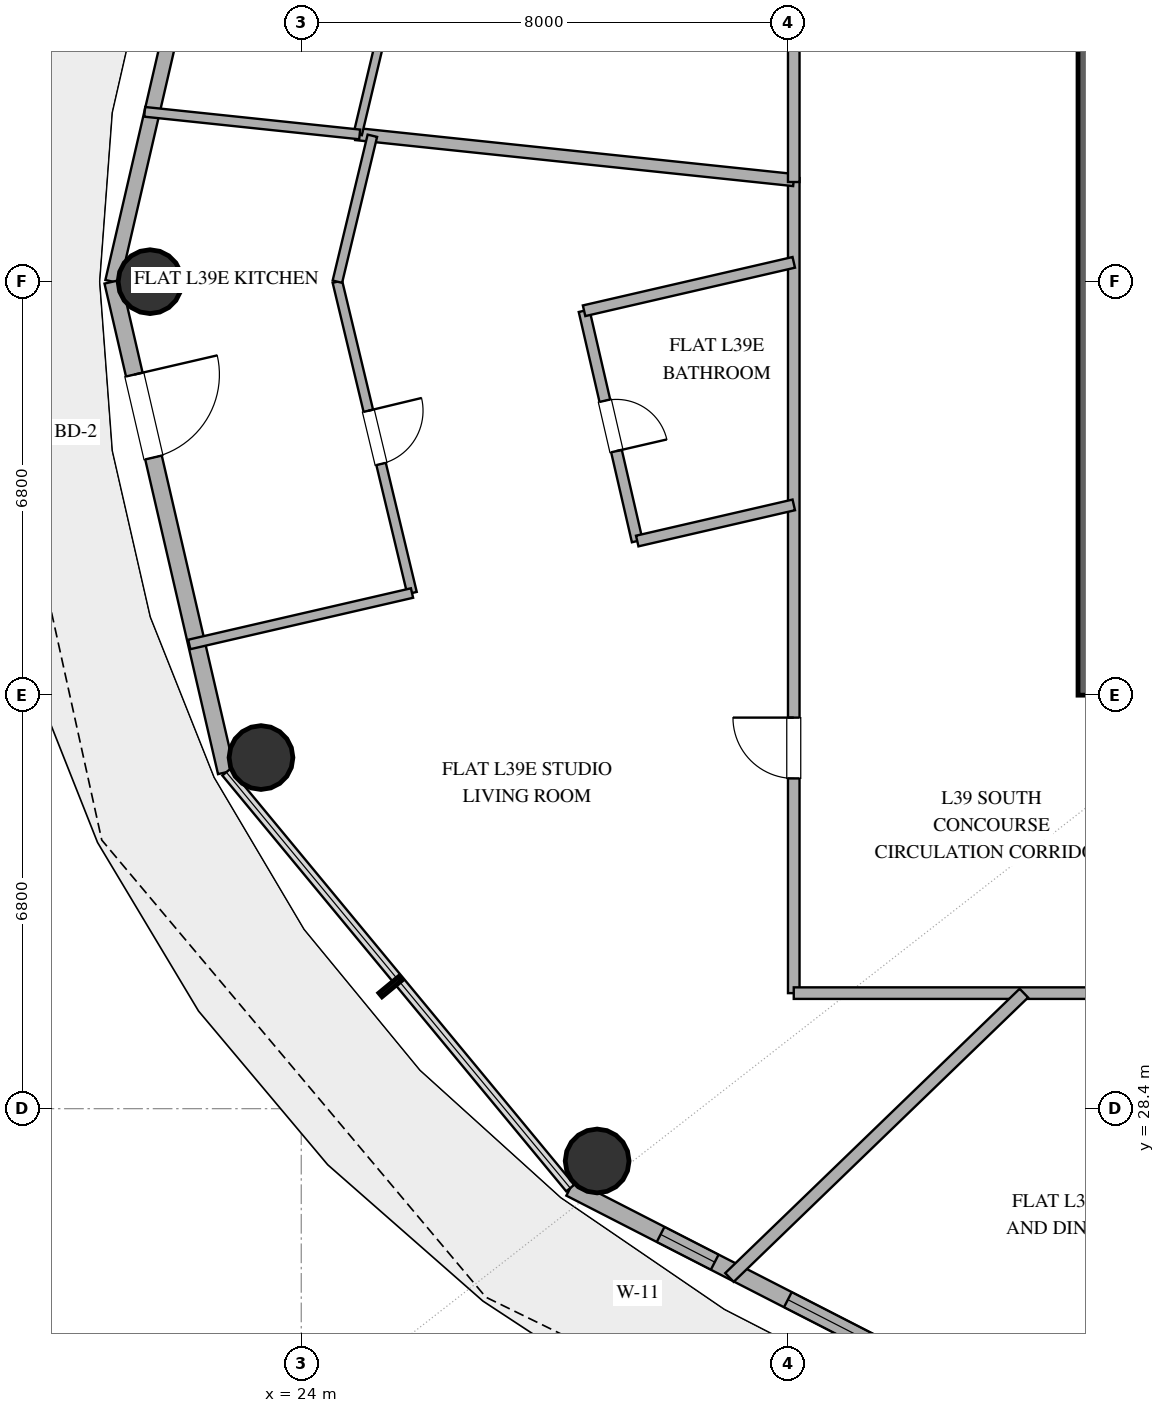
"""IFC4 building model, lengths in metres.
Left out: names, types, materials, properties, quantities, classifications, styles, units other than length and angle.
Written with IfcOpenShell. Run it as: python <this file> out.ifc"""

import sys

from ifc_helpers import new_model, si_unit, direction, frame, frame_2d, origin, origin_2d, place, context, subcontext, project, spatial, rectangle, hollow_circle, extrude, element, fill, save


model = new_model("IFC4")
c1 = context("Model", 3, precision=1e-05, world=origin(), true_north=direction((0.0, 1.0)))
c2 = subcontext(c1, "Body", "Model", "MODEL_VIEW")
j1 = project(units=[si_unit("LENGTHUNIT", "METRE"), si_unit("PLANEANGLEUNIT", "RADIAN")], contexts=[c1])
p1 = place(None, origin())
s1 = spatial("IfcSite", under=j1, at=p1, CompositionType="ELEMENT")
p2 = place(p1, origin())
s2 = spatial("IfcBuilding", under=s1, at=p2, CompositionType="ELEMENT")
p3 = place(p2, frame((0.0, 0.0, 157.8)))
s3 = spatial("IfcBuildingStorey", under=s2, at=p3, CompositionType="ELEMENT", Elevation=157.8)
p4 = place(p3, frame((37.0, 35.2, 0.0), z_axis=(0.0, 0.0, 1.0), x_axis=(0.0, 1.0, 0.0)))
e1 = element("IfcWall", 1, at=p4, inside=s3, PredefinedType="SHEAR", context=c2, shape_type="SweptSolid", body=[
    extrude(rectangle(XDim=13.6, YDim=0.45, at=frame_2d((6.8, 0.0))), origin(), (0.0, 0.0, 1.0), 3.38),
])
for number, where, z_axis, x_axis in (
    (2, (21.513, 42.0, 0.0), (0.0, 0.0, 1.0), (1.0, 0.0, 0.0)),
    (3, (23.338, 34.174, 0.0), (0.0, 0.0, 1.0), (1.0, 0.0, 0.0)),
    (4, (28.866, 27.54, 0.0), (0.0, 0.0, 1.0), (1.0, 0.0, 0.0)),
):
    element("IfcColumn", number, at=place(p3, frame(where, z_axis=z_axis, x_axis=x_axis)), inside=s3, PredefinedType="COLUMN", context=c2, shape_type="SweptSolid", body=[
        extrude(hollow_circle(Radius=0.525, WallThickness=0.028, at=origin_2d()), origin(), (0.0, 0.0, 1.0), 3.38),
    ])
p5 = place(p3, frame((22.768, 50.067, 0.0), z_axis=(0.0, 0.0, 1.0), x_axis=(-0.225473184558, -0.974249374157, 0.0)))
e5 = element("IfcWall", 5, at=p5, inside=s3, PredefinedType="SOLIDWALL", context=c2, shape_type="SweptSolid", body=[
    extrude(rectangle(XDim=8.28, YDim=0.25, at=frame_2d((4.14, 0.0))), origin(), (0.0, 0.0, 1.0), 3.38),
])
p6 = place(p5, frame((2.447, 0.0, 0.35)))
e6 = element("IfcOpeningElement", 6, at=p6, cuts=e5, PredefinedType="OPENING", context=c2, shape_type="SweptSolid", body=[
    extrude(rectangle(XDim=1.0, YDim=1.05, at=frame_2d((0.5, 0.525))), frame((0.0, 0.135, 0.0), z_axis=(0.0, -1.0, 0.0), x_axis=(1.0, 0.0, 0.0)), (0.0, 0.0, 1.0), 0.27),
])
p7 = place(p3, frame((20.901, 42.0, 0.0), z_axis=(0.0, 0.0, 1.0), x_axis=(0.225473184558, -0.974249374157, 0.0)))
e7 = element("IfcWall", 7, at=p7, inside=s3, PredefinedType="SOLIDWALL", context=c2, shape_type="SweptSolid", body=[
    extrude(rectangle(XDim=8.28, YDim=0.28, at=frame_2d((4.14, 0.0))), origin(), (0.0, 0.0, 1.0), 3.38),
])
p8 = place(p7, frame((1.568, 0.0, 0.0)))
e8 = element("IfcOpeningElement", 8, at=p8, cuts=e7, PredefinedType="OPENING", context=c2, shape_type="SweptSolid", body=[
    extrude(rectangle(XDim=1.4, YDim=2.2, at=frame_2d((0.7, 1.1))), frame((0.0, 0.15, 0.0), z_axis=(0.0, -1.0, 0.0), x_axis=(1.0, 0.0, 0.0)), (0.0, 0.0, 1.0), 0.3),
])
p9 = place(p3, frame((28.424, 27.094, 0.0), z_axis=(0.0, 0.0, 1.0), x_axis=(0.889872523182, -0.456209263919, 0.0)))
e9 = element("IfcWall", 9, at=p9, inside=s3, PredefinedType="SOLIDWALL", context=c2, shape_type="SweptSolid", body=[
    extrude(rectangle(XDim=10.016, YDim=0.28, at=frame_2d((5.008, 0.0))), origin(), (0.0, 0.0, 1.0), 3.38),
])
p10 = place(p9, frame((1.67, 0.0, 0.85)))
e10 = element("IfcOpeningElement", 10, at=p10, cuts=e9, PredefinedType="OPENING", context=c2, shape_type="SweptSolid", body=[
    extrude(rectangle(XDim=1.0, YDim=1.8, at=frame_2d((0.5, 0.9))), frame((0.0, 0.15, 0.0), z_axis=(0.0, -1.0, 0.0), x_axis=(1.0, 0.0, 0.0)), (0.0, 0.0, 1.0), 0.3),
])
p11 = place(p9, frame((4.022, 0.0, 0.85)))
e11 = element("IfcOpeningElement", 11, at=p11, cuts=e9, PredefinedType="OPENING", context=c2, shape_type="SweptSolid", body=[
    extrude(rectangle(XDim=1.5, YDim=2.0, at=frame_2d((0.75, 1.0))), frame((0.0, 0.15, 0.0), z_axis=(0.0, -1.0, 0.0), x_axis=(1.0, 0.0, 0.0)), (0.0, 0.0, 1.0), 0.3),
])
p12 = place(p9, frame((6.294, 0.0, 0.85)))
e12 = element("IfcOpeningElement", 12, at=p12, cuts=e9, PredefinedType="OPENING", context=c2, shape_type="SweptSolid", body=[
    extrude(rectangle(XDim=1.5, YDim=2.0, at=frame_2d((0.75, 1.0))), frame((0.0, 0.15, 0.0), z_axis=(0.0, -1.0, 0.0), x_axis=(1.0, 0.0, 0.0)), (0.0, 0.0, 1.0), 0.3),
])
p13 = place(p3, frame((32.1, 30.3, 0.0), z_axis=(0.0, 0.0, 1.0), x_axis=(0.0, 1.0, 0.0)))
e13 = element("IfcWall", 13, at=p13, inside=s3, PredefinedType="PARTITIONING", context=c2, shape_type="SweptSolid", body=[
    extrude(rectangle(XDim=13.403, YDim=0.19, at=frame_2d((6.702, 0.0))), origin(), (0.0, 0.0, 1.0), 2.74),
])
p14 = place(p13, frame((3.531, 0.0, 0.0)))
e14 = element("IfcOpeningElement", 14, at=p14, cuts=e13, PredefinedType="OPENING", context=c2, shape_type="SweptSolid", body=[
    extrude(rectangle(XDim=1.0, YDim=2.2, at=frame_2d((0.5, 1.1))), frame((0.0, 0.105, 0.0), z_axis=(0.0, -1.0, 0.0), x_axis=(1.0, 0.0, 0.0)), (0.0, 0.0, 1.0), 0.21),
])
p15 = place(p3, frame((32.1, 43.671, 0.0), z_axis=(0.0, 0.0, 1.0), x_axis=(-0.994522615629, 0.104521610217, 0.0)))
e15 = element("IfcWall", 15, at=p15, inside=s3, PredefinedType="PARTITIONING", context=c2, shape_type="SweptSolid", body=[
    extrude(rectangle(XDim=7.243, YDim=0.2, at=frame_2d((3.622, 0.0))), origin(), (0.0, 0.0, 1.0), 2.74),
])
p16 = place(p3, frame((32.1, 30.3, 0.0), z_axis=(0.0, 0.0, 1.0), x_axis=(1.0, 0.0, 0.0)))
e16 = element("IfcWall", 16, at=p16, inside=s3, PredefinedType="PARTITIONING", context=c2, shape_type="SweptSolid", body=[
    extrude(rectangle(XDim=15.491, YDim=0.19, at=frame_2d((7.746, 0.0))), origin(), (0.0, 0.0, 1.0), 2.74),
])
p17 = place(p16, frame((6.738, 0.0, 0.0)))
e17 = element("IfcOpeningElement", 17, at=p17, cuts=e16, PredefinedType="OPENING", context=c2, shape_type="SweptSolid", body=[
    extrude(rectangle(XDim=1.0, YDim=2.2, at=frame_2d((0.5, 1.1))), frame((0.0, 0.105, 0.0), z_axis=(0.0, -1.0, 0.0), x_axis=(1.0, 0.0, 0.0)), (0.0, 0.0, 1.0), 0.21),
])
p18 = place(p3, frame((31.042, 25.624, 0.0), z_axis=(0.0, 0.0, 1.0), x_axis=(0.719330837604, 0.694667651522, 0.0)))
e18 = element("IfcWall", 18, at=p18, inside=s3, PredefinedType="PARTITIONING", context=c2, shape_type="SweptSolid", body=[
    extrude(rectangle(XDim=6.731, YDim=0.2, at=frame_2d((3.366, 0.0))), origin(), (0.0, 0.0, 1.0), 2.74),
])
p19 = place(p3, frame((32.1, 43.639, 0.0), z_axis=(0.0, 0.0, 1.0), x_axis=(0.0, 1.0, 0.0)))
e19 = element("IfcWall", 19, at=p19, inside=s3, PredefinedType="PARTITIONING", context=c2, shape_type="SweptSolid", body=[
    extrude(rectangle(XDim=10.061, YDim=0.19, at=frame_2d((5.031, 0.0))), origin(), (0.0, 0.0, 1.0), 2.74),
])
p20 = place(p3, frame((24.594, 42.0, 0.0), z_axis=(0.0, 0.0, 1.0), x_axis=(0.233087094169, -0.972455863539, 0.0)))
e20 = element("IfcWall", 20, at=p20, inside=s3, PredefinedType="PLUMBINGWALL", context=c2, shape_type="SweptSolid", body=[
    extrude(rectangle(XDim=5.265, YDim=0.16, at=frame_2d((2.633, 0.0))), origin(), (0.0, 0.0, 1.0), 2.74),
])
p21 = place(p20, frame((2.183, 0.0, 0.0)))
e21 = element("IfcOpeningElement", 21, at=p21, cuts=e20, PredefinedType="OPENING", context=c2, shape_type="SweptSolid", body=[
    extrude(rectangle(XDim=0.9, YDim=2.1, at=frame_2d((0.45, 1.05))), frame((0.0, 0.09, 0.0), z_axis=(0.0, -1.0, 0.0), x_axis=(1.0, 0.0, 0.0)), (0.0, 0.0, 1.0), 0.18),
])
p22 = place(p3, frame((24.929, 44.425, 0.0), z_axis=(0.0, 0.0, 1.0), x_axis=(0.23166656053, 0.972795253243, 0.0)))
e22 = element("IfcWall", 22, at=p22, inside=s3, PredefinedType="PARTITIONING", context=c2, shape_type="SweptSolid", body=[
    extrude(rectangle(XDim=4.541, YDim=0.14, at=frame_2d((2.271, 0.0))), origin(), (0.0, 0.0, 1.0), 2.74),
])
p23 = place(p22, frame((1.821, 0.0, 0.0)))
e23 = element("IfcOpeningElement", 23, at=p23, cuts=e22, PredefinedType="OPENING", context=c2, shape_type="SweptSolid", body=[
    extrude(rectangle(XDim=0.9, YDim=2.1, at=frame_2d((0.45, 1.05))), frame((0.0, 0.08, 0.0), z_axis=(0.0, -1.0, 0.0), x_axis=(1.0, 0.0, 0.0)), (0.0, 0.0, 1.0), 0.16),
])
p24 = place(p3, frame((28.652, 41.522, 0.0), z_axis=(0.0, 0.0, 1.0), x_axis=(0.224891621851, -0.974383783948, 0.0)))
e24 = element("IfcWall", 24, at=p24, inside=s3, PredefinedType="PLUMBINGWALL", context=c2, shape_type="SweptSolid", body=[
    extrude(rectangle(XDim=3.886, YDim=0.18, at=frame_2d((1.943, 0.0))), origin(), (0.0, 0.0, 1.0), 2.74),
])
p25 = place(p24, frame((1.518, 0.0, 0.0)))
e25 = element("IfcOpeningElement", 25, at=p25, cuts=e24, PredefinedType="OPENING", context=c2, shape_type="SweptSolid", body=[
    extrude(rectangle(XDim=0.85, YDim=2.1, at=frame_2d((0.425, 1.05))), frame((0.0, 0.1, 0.0), z_axis=(0.0, -1.0, 0.0), x_axis=(1.0, 0.0, 0.0)), (0.0, 0.0, 1.0), 0.2),
])
p26 = place(p3, frame((25.822, 36.88, 0.0), z_axis=(0.0, 0.0, 1.0), x_axis=(-0.97437258695, -0.22494012937, 0.0)))
e26 = element("IfcWall", 26, at=p26, inside=s3, PredefinedType="PLUMBINGWALL", context=c2, shape_type="SweptSolid", body=[
    extrude(rectangle(XDim=3.76, YDim=0.16, at=frame_2d((1.88, 0.0))), origin(), (0.0, 0.0, 1.0), 2.74),
])
p27 = place(p3, frame((21.425, 44.793, 0.0), z_axis=(0.0, 0.0, 1.0), x_axis=(0.994516359121, -0.104581123727, 0.0)))
e27 = element("IfcWall", 27, at=p27, inside=s3, PredefinedType="PLUMBINGWALL", context=c2, shape_type="SweptSolid", body=[
    extrude(rectangle(XDim=3.555, YDim=0.16, at=frame_2d((1.778, 0.0))), origin(), (0.0, 0.0, 1.0), 2.74),
])
p28 = place(p3, frame((32.1, 42.318, 0.0), z_axis=(0.0, 0.0, 1.0), x_axis=(-0.974370264362, -0.224950189882, 0.0)))
e28 = element("IfcWall", 28, at=p28, inside=s3, PredefinedType="PLUMBINGWALL", context=c2, shape_type="SweptSolid", body=[
    extrude(rectangle(XDim=3.539, YDim=0.18, at=frame_2d((1.77, 0.0))), origin(), (0.0, 0.0, 1.0), 2.74),
])
p29 = place(p3, frame((29.526, 37.735, 0.0), z_axis=(0.0, 0.0, 1.0), x_axis=(0.974380293177, 0.224906745718, 0.0)))
e29 = element("IfcWall", 29, at=p29, inside=s3, PredefinedType="PLUMBINGWALL", context=c2, shape_type="SweptSolid", body=[
    extrude(rectangle(XDim=2.642, YDim=0.18, at=frame_2d((1.321, 0.0))), origin(), (0.0, 0.0, 1.0), 2.74),
])
p30 = place(p3, frame((25.169, 44.4, 0.0), z_axis=(0.0, 0.0, 1.0), x_axis=(-0.233096038601, -0.972453719613, 0.0)))
e30 = element("IfcWall", 30, at=p30, inside=s3, PredefinedType="PLUMBINGWALL", context=c2, shape_type="SweptSolid", body=[
    extrude(rectangle(XDim=2.468, YDim=0.16, at=frame_2d((1.234, 0.0))), origin(), (0.0, 0.0, 1.0), 2.74),
])
p31 = place(p8, origin())
e31 = element("IfcDoor", 31, at=p31, inside=s3, OperationType="SINGLE_SWING_LEFT", PredefinedType="DOOR", context=c2, shape_type="SweptSolid", body=[
    extrude(rectangle(XDim=1.4, YDim=2.2, at=frame_2d((0.7, 1.1))), frame((0.0, 0.025, 0.0), z_axis=(0.0, -1.0, 0.0), x_axis=(1.0, 0.0, 0.0)), (0.0, 0.0, 1.0), 0.05),
])
fill(e8, e31)
p32 = place(p10, origin())
e32 = element("IfcWindow", 32, at=p32, inside=s3, PartitioningType="SINGLE_PANEL", PredefinedType="WINDOW", context=c2, shape_type="SweptSolid", body=[
    extrude(rectangle(XDim=1.0, YDim=1.8, at=frame_2d((0.5, 0.9))), frame((0.0, 0.03, 0.0), z_axis=(0.0, -1.0, 0.0), x_axis=(1.0, 0.0, 0.0)), (0.0, 0.0, 1.0), 0.06),
])
fill(e10, e32)
p33 = place(p11, origin())
e33 = element("IfcWindow", 33, at=p33, inside=s3, PartitioningType="SINGLE_PANEL", PredefinedType="WINDOW", context=c2, shape_type="SweptSolid", body=[
    extrude(rectangle(XDim=1.5, YDim=2.0, at=frame_2d((0.75, 1.0))), frame((0.0, 0.03, 0.0), z_axis=(0.0, -1.0, 0.0), x_axis=(1.0, 0.0, 0.0)), (0.0, 0.0, 1.0), 0.06),
])
fill(e11, e33)
p34 = place(p14, origin())
e34 = element("IfcDoor", 34, at=p34, inside=s3, OperationType="SINGLE_SWING_RIGHT", PredefinedType="DOOR", context=c2, shape_type="SweptSolid", body=[
    extrude(rectangle(XDim=1.0, YDim=2.2, at=frame_2d((0.5, 1.1))), frame((0.0, 0.025, 0.0), z_axis=(0.0, -1.0, 0.0), x_axis=(1.0, 0.0, 0.0)), (0.0, 0.0, 1.0), 0.05),
])
fill(e14, e34)
p35 = place(p21, origin())
e35 = element("IfcDoor", 35, at=p35, inside=s3, OperationType="SINGLE_SWING_LEFT", PredefinedType="DOOR", context=c2, shape_type="SweptSolid", body=[
    extrude(rectangle(XDim=0.9, YDim=2.1, at=frame_2d((0.45, 1.05))), frame((0.0, 0.025, 0.0), z_axis=(0.0, -1.0, 0.0), x_axis=(1.0, 0.0, 0.0)), (0.0, 0.0, 1.0), 0.05),
])
fill(e21, e35)
p36 = place(p25, origin())
e36 = element("IfcDoor", 36, at=p36, inside=s3, OperationType="SINGLE_SWING_RIGHT", PredefinedType="DOOR", context=c2, shape_type="SweptSolid", body=[
    extrude(rectangle(XDim=0.85, YDim=2.1, at=frame_2d((0.425, 1.05))), frame((0.0, 0.025, 0.0), z_axis=(0.0, -1.0, 0.0), x_axis=(1.0, 0.0, 0.0)), (0.0, 0.0, 1.0), 0.05),
])
fill(e25, e36)
save(model, sys.argv[1])
